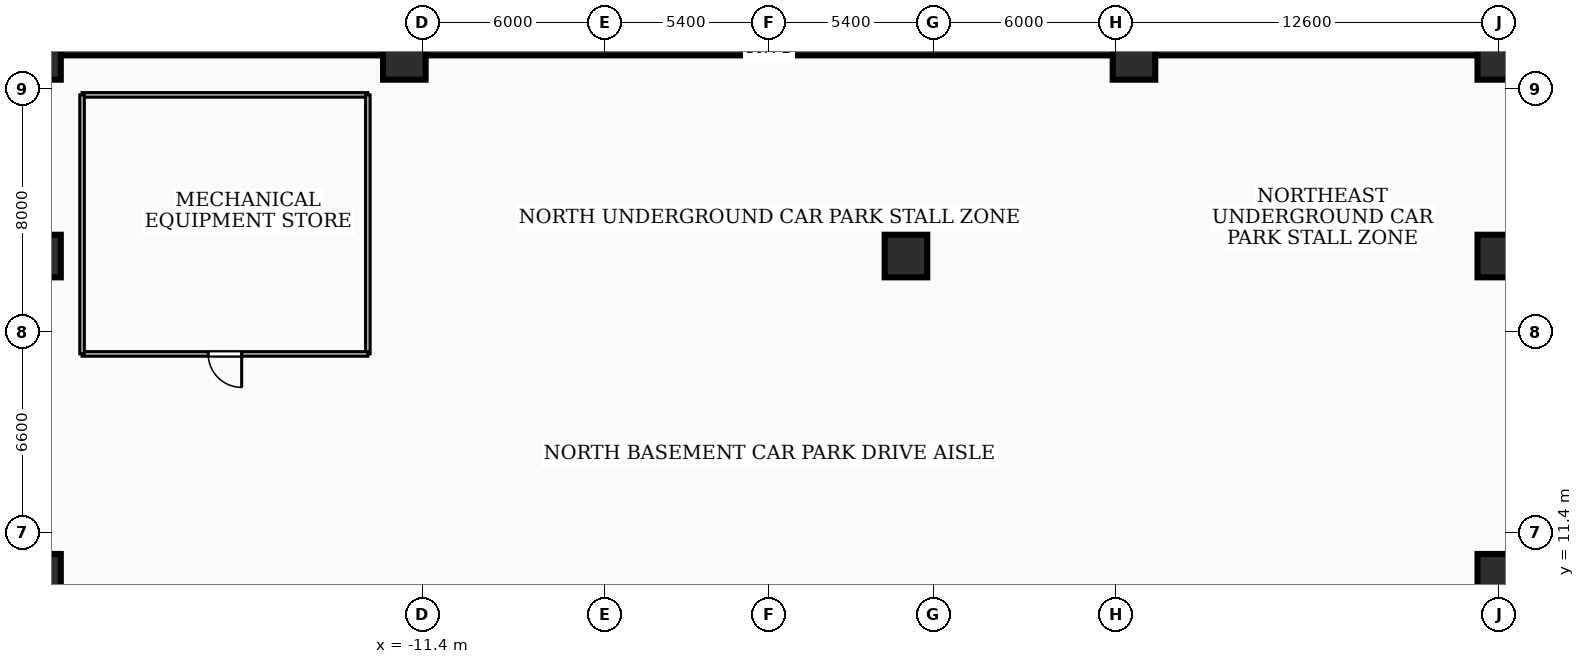
"""IFC4 building model, lengths in metres.
Left out: names, types, materials, properties, quantities, classifications, styles, units other than length and angle.
Written with IfcOpenShell. Run it as: python <this file> out.ifc"""

import sys

from ifc_helpers import new_model, si_unit, direction, frame, frame_2d, origin, origin_2d, place, context, subcontext, project, spatial, rectangle, extrude, element, fill, save


model = new_model("IFC4")
c1 = context("Model", 3, precision=1e-05, world=origin(), true_north=direction((0.0, 1.0)))
c2 = subcontext(c1, "Body", "Model", "MODEL_VIEW")
j1 = project(units=[si_unit("LENGTHUNIT", "METRE"), si_unit("PLANEANGLEUNIT", "RADIAN")], contexts=[c1])
p1 = place(None, origin())
s1 = spatial("IfcSite", under=j1, at=p1, CompositionType="ELEMENT")
p2 = place(p1, origin())
s2 = spatial("IfcBuilding", under=s1, at=p2, CompositionType="ELEMENT")
p3 = place(p2, frame((0.0, 0.0, -9.0)))
s3 = spatial("IfcBuildingStorey", under=s2, at=p3, CompositionType="ELEMENT", Elevation=-9.0)
p4 = place(p3, frame((-35.75, 27.35, 0.0), z_axis=(0.0, 0.0, 1.0), x_axis=(1.0, 0.0, 0.0)))
e1 = element("IfcWall", 1, at=p4, inside=s3, PredefinedType="USERDEFINED", context=c2, shape_type="SweptSolid", body=[
    extrude(rectangle(XDim=71.5, YDim=0.5, at=frame_2d((35.75, 0.0))), origin(), (0.0, 0.0, 1.0), 4.18),
])
p5 = place(p2, frame((0.0, 0.0, -4.5)))
s4 = spatial("IfcBuildingStorey", under=s2, at=p5, CompositionType="ELEMENT", Elevation=-4.5)
p6 = place(p5, frame((-21.8, 26.62, -4.85), z_axis=(0.0, 0.0, 1.0), x_axis=(0.0, 1.0, 0.0)))
e2 = element("IfcWall", 2, at=p6, inside=s4, PredefinedType="SOLIDWALL", context=c2, shape_type="SweptSolid", body=[
    extrude(rectangle(XDim=1.96, YDim=0.3, at=frame_2d((0.98, 0.0))), origin(), (0.0, 0.0, 1.0), 9.35),
])
for number, where, z_axis, x_axis in (
    (3, (-24.0, 27.0, 0.0), (0.0, 0.0, 1.0), (1.0, 0.0, 0.0)),
    (4, (-12.0, 27.0, 0.0), (0.0, 0.0, 1.0), (1.0, 0.0, 0.0)),
    (5, (12.0, 27.0, 0.0), (0.0, 0.0, 1.0), (1.0, 0.0, 0.0)),
    (6, (24.0, 27.0, 0.0), (0.0, 0.0, 1.0), (1.0, 0.0, 0.0)),
    (7, (-24.0, 10.0, 0.0), (0.0, 0.0, 1.0), (1.0, 0.0, 0.0)),
    (8, (24.0, 10.0, 0.0), (0.0, 0.0, 1.0), (1.0, 0.0, 0.0)),
    (9, (4.5, 20.5, 0.0), (0.0, 0.0, 1.0), (1.0, 0.0, 0.0)),
    (10, (-24.0, 20.5, 0.0), (0.0, 0.0, 1.0), (1.0, 0.0, 0.0)),
    (11, (24.0, 20.5, 0.0), (0.0, 0.0, 1.0), (1.0, 0.0, 0.0)),
):
    element("IfcColumn", number, at=place(p3, frame(where, z_axis=z_axis, x_axis=x_axis)), inside=s3, PredefinedType="COLUMN", context=c2, shape_type="SweptSolid", body=[
        extrude(rectangle(XDim=1.4, YDim=1.4, at=origin_2d()), origin(), (0.0, 0.0, 1.0), 4.5),
    ])
p7 = place(p3, frame((-13.2, 17.28, 0.0), z_axis=(0.0, 0.0, 1.0), x_axis=(-1.0, 0.0, 0.0)))
e12 = element("IfcWall", 12, at=p7, inside=s3, PredefinedType="PARTITIONING", context=c2, shape_type="SweptSolid", body=[
    extrude(rectangle(XDim=9.4, YDim=0.15, at=frame_2d((4.7, 0.0))), origin(), (0.0, 0.0, 1.0), 4.18),
])
p8 = place(p7, frame((4.15, 0.0, 0.0)))
e13 = element("IfcOpeningElement", 13, at=p8, cuts=e12, PredefinedType="OPENING", context=c2, shape_type="SweptSolid", body=[
    extrude(rectangle(XDim=1.1, YDim=2.15, at=frame_2d((0.55, 1.075))), frame((0.0, 0.085, 0.0), z_axis=(0.0, -1.0, 0.0), x_axis=(1.0, 0.0, 0.0)), (0.0, 0.0, 1.0), 0.17),
])
for number, where, z_axis, x_axis in (
    (14, (-22.6, 17.28, 0.0), (0.0, 0.0, 1.0), (0.0, 1.0, 0.0)),
    (15, (-13.2, 17.28, 0.0), (0.0, 0.0, 1.0), (0.0, 1.0, 0.0)),
):
    element("IfcWall", number, at=place(p3, frame(where, z_axis=z_axis, x_axis=x_axis)), inside=s3, PredefinedType="PARTITIONING", context=c2, shape_type="SweptSolid", body=[
        extrude(rectangle(XDim=8.52, YDim=0.15, at=frame_2d((4.26, 0.0))), origin(), (0.0, 0.0, 1.0), 3.072),
    ])
p9 = place(p3, frame((-22.6, 25.8, 0.0), z_axis=(0.0, 0.0, 1.0), x_axis=(1.0, 0.0, 0.0)))
e16 = element("IfcWall", 16, at=p9, inside=s3, PredefinedType="PARTITIONING", context=c2, shape_type="SweptSolid", body=[
    extrude(rectangle(XDim=9.4, YDim=0.15, at=frame_2d((4.7, 0.0))), origin(), (0.0, 0.0, 1.0), 4.18),
])
p10 = place(p8, origin())
e17 = element("IfcDoor", 17, at=p10, inside=s3, OperationType="SINGLE_SWING_LEFT", PredefinedType="DOOR", context=c2, shape_type="SweptSolid", body=[
    extrude(rectangle(XDim=1.1, YDim=2.15, at=frame_2d((0.55, 1.075))), frame((0.0, 0.025, 0.0), z_axis=(0.0, -1.0, 0.0), x_axis=(1.0, 0.0, 0.0)), (0.0, 0.0, 1.0), 0.05),
])
fill(e13, e17)
save(model, sys.argv[1])
